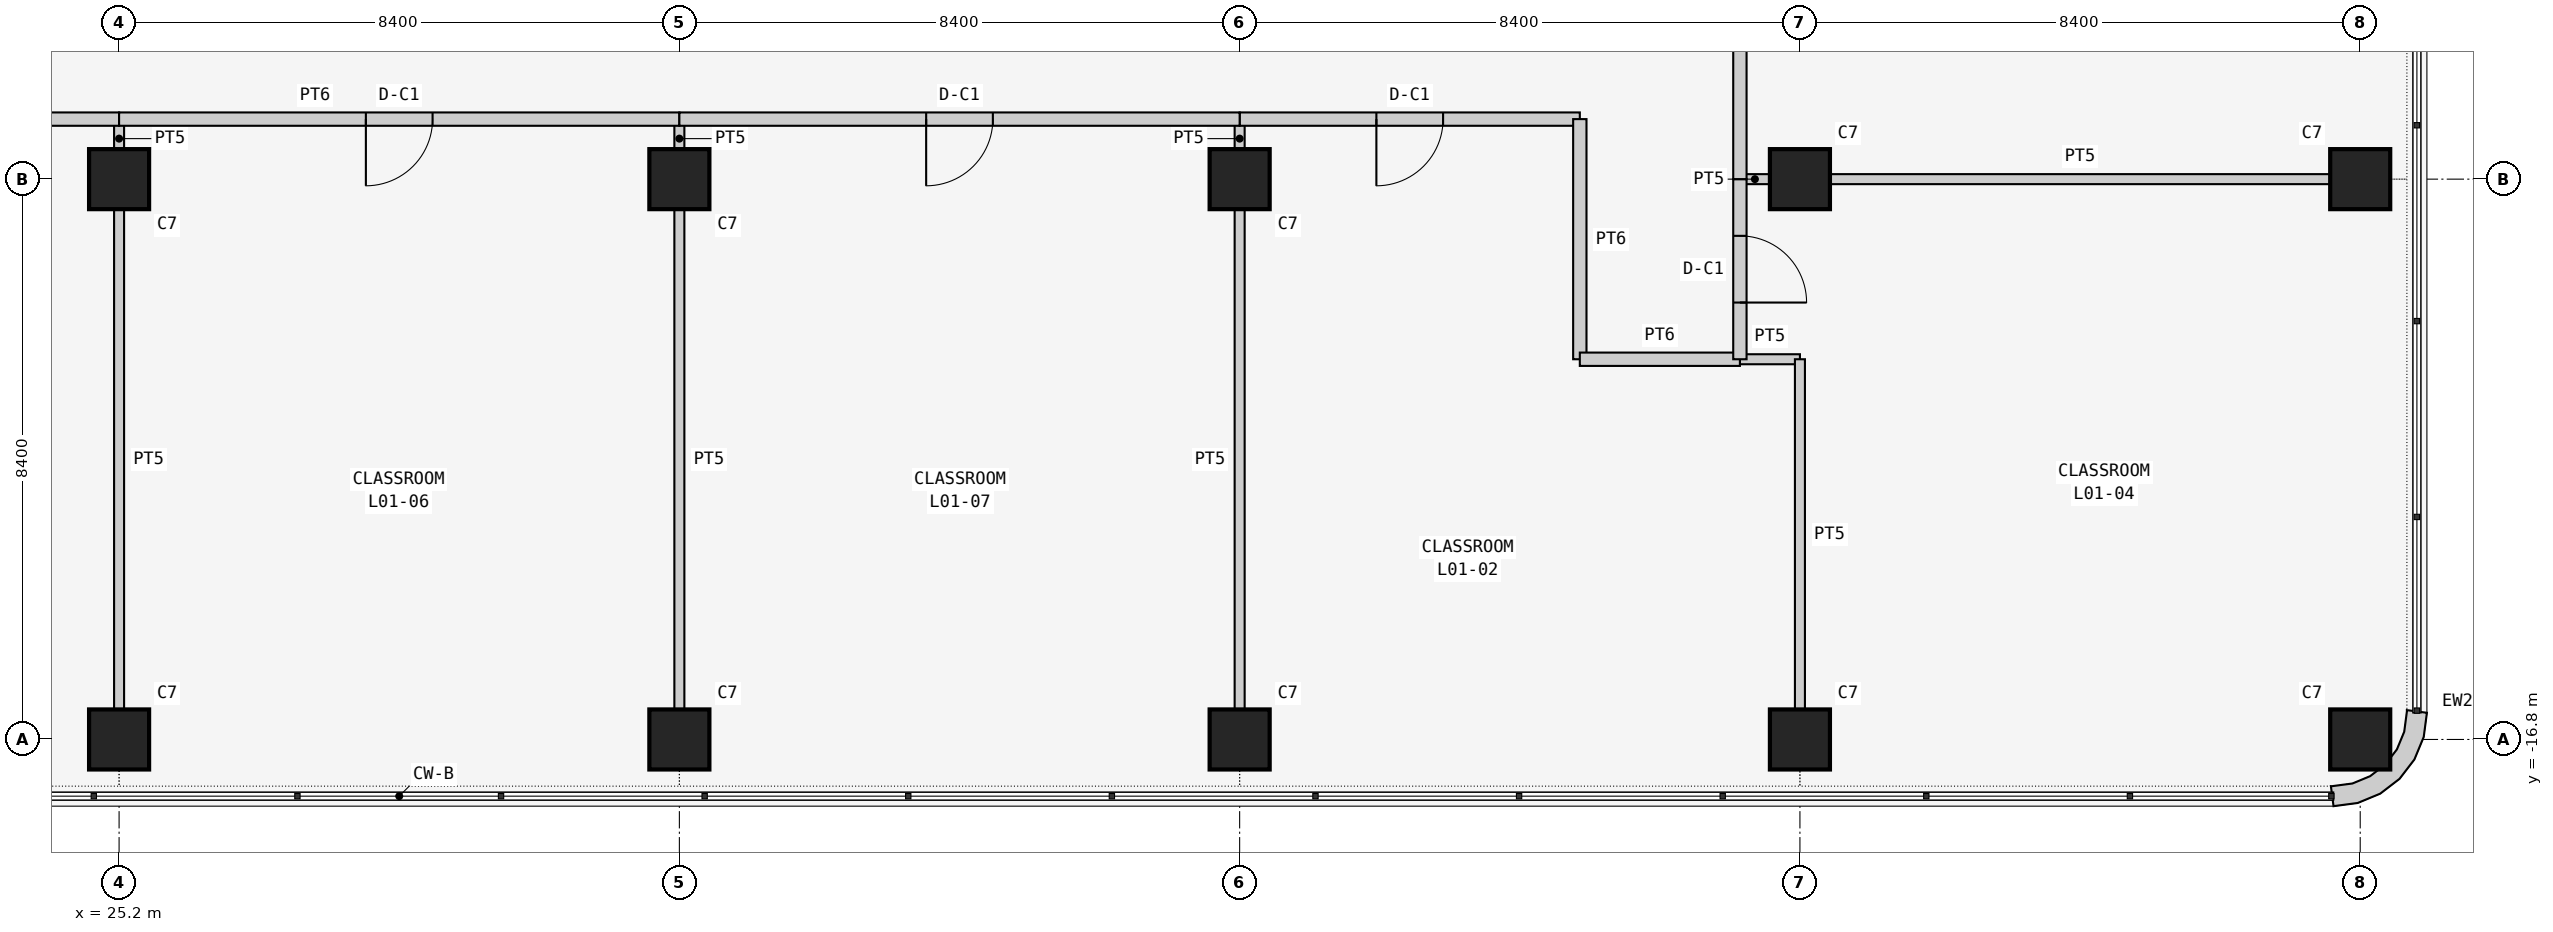
"""IFC4 building model, lengths in metres.
Left out: names, types, materials, properties, quantities, classifications, styles, units other than length and angle.
Written with IfcOpenShell. Run it as: python <this file> out.ifc"""

import sys

from ifc_helpers import new_model, si_unit, direction, frame, frame_2d, origin, origin_2d, place, context, subcontext, project, spatial, polyline, rectangle, outline, extrude, element, fill, save


model = new_model("IFC4")
c1 = context("Model", 3, precision=1e-05, world=origin(), true_north=direction((0.0, 1.0)))
c2 = subcontext(c1, "Body", "Model", "MODEL_VIEW")
j1 = project(units=[si_unit("LENGTHUNIT", "METRE"), si_unit("PLANEANGLEUNIT", "RADIAN")], contexts=[c1])
p1 = place(None, origin())
s1 = spatial("IfcSite", under=j1, at=p1, CompositionType="ELEMENT")
p2 = place(p1, origin())
s2 = spatial("IfcBuilding", under=s1, at=p2, CompositionType="ELEMENT")
p3 = place(p2, frame((0.0, 0.0, 6.0)))
s3 = spatial("IfcBuildingStorey", under=s2, at=p3, CompositionType="ELEMENT", Elevation=6.0)
for number, where, z_axis, x_axis in (
    (1, (25.2, -16.8, 0.0), (0.0, 0.0, 1.0), (1.0, 0.0, 0.0)),
    (2, (25.2, -8.4, 0.0), (0.0, 0.0, 1.0), (1.0, 0.0, 0.0)),
    (3, (33.6, -16.8, 0.0), (0.0, 0.0, 1.0), (1.0, 0.0, 0.0)),
    (4, (33.6, -8.4, 0.0), (0.0, 0.0, 1.0), (1.0, 0.0, 0.0)),
    (5, (42.0, -16.8, 0.0), (0.0, 0.0, 1.0), (1.0, 0.0, 0.0)),
    (6, (42.0, -8.4, 0.0), (0.0, 0.0, 1.0), (1.0, 0.0, 0.0)),
    (7, (50.4, -16.8, 0.0), (0.0, 0.0, 1.0), (1.0, 0.0, 0.0)),
    (8, (50.4, -8.4, 0.0), (0.0, 0.0, 1.0), (1.0, 0.0, 0.0)),
    (9, (58.8, -16.8, 0.0), (0.0, 0.0, 1.0), (1.0, 0.0, 0.0)),
    (10, (58.8, -8.4, 0.0), (0.0, 0.0, 1.0), (1.0, 0.0, 0.0)),
):
    element("IfcColumn", number, at=place(p3, frame(where, z_axis=z_axis, x_axis=x_axis)), inside=s3, PredefinedType="COLUMN", context=c2, shape_type="SweptSolid", body=[
        extrude(rectangle(XDim=0.9, YDim=0.9, at=origin_2d()), origin(), (0.0, 0.0, 1.0), 4.5),
    ])
p4 = place(p3, frame((58.355, -17.648, 0.0), z_axis=(0.0, 0.0, 1.0), x_axis=(0.707106781187, -0.707106781187, 0.0)))
e11 = element("IfcWall", 11, at=p4, inside=s3, PredefinedType="SOLIDWALL", context=c2, shape_type="SweptSolid", body=[
    extrude(outline(polyline([(0.139, 1.904), (-0.101, 1.72), (-0.087, 1.706), (0.1, 1.463), (0.209, 1.198), (0.246, 0.914), (0.209, 0.63), (0.1, 0.365), (-0.087, 0.122), (-0.101, 0.108), (0.139, -0.076), (0.362, 0.214), (0.502, 0.552), (0.549, 0.914), (0.502, 1.276), (0.362, 1.614), (0.139, 1.904)])), origin(), (0.0, 0.0, 1.0), 4.3),
])
p5 = place(p3, frame((49.5, -11.1, 0.0), z_axis=(0.0, 0.0, 1.0), x_axis=(1.0, 0.0, 0.0)))
e12 = element("IfcWall", 12, at=p5, inside=s3, PredefinedType="PARTITIONING", context=c2, shape_type="SweptSolid", body=[
    extrude(rectangle(XDim=0.9, YDim=0.15, at=frame_2d((0.45, 0.0))), origin(), (0.0, 0.0, 1.0), 4.3),
])
p6 = place(p3, frame((50.4, -11.1, 0.0), z_axis=(0.0, 0.0, 1.0), x_axis=(0.0, -1.0, 0.0)))
e13 = element("IfcWall", 13, at=p6, inside=s3, PredefinedType="PARTITIONING", context=c2, shape_type="SweptSolid", body=[
    extrude(rectangle(XDim=5.25, YDim=0.15, at=frame_2d((2.625, 0.0))), origin(), (0.0, 0.0, 1.0), 3.543),
])
p7 = place(p3, frame((42.0, -16.35, 0.0), z_axis=(0.0, 0.0, 1.0), x_axis=(0.0, 1.0, 0.0)))
e14 = element("IfcWall", 14, at=p7, inside=s3, PredefinedType="PARTITIONING", context=c2, shape_type="SweptSolid", body=[
    extrude(rectangle(XDim=7.5, YDim=0.15, at=frame_2d((3.75, 0.0))), origin(), (0.0, 0.0, 1.0), 3.543),
])
p8 = place(p3, frame((42.0, -7.95, 0.0), z_axis=(0.0, 0.0, 1.0), x_axis=(0.0, 1.0, 0.0)))
e15 = element("IfcWall", 15, at=p8, inside=s3, PredefinedType="PARTITIONING", context=c2, shape_type="SweptSolid", body=[
    extrude(rectangle(XDim=0.45, YDim=0.15, at=frame_2d((0.225, 0.0))), origin(), (0.0, 0.0, 1.0), 3.543),
])
p9 = place(p3, frame((42.0, -7.5, 0.0), z_axis=(0.0, 0.0, 1.0), x_axis=(1.0, 0.0, 0.0)))
e16 = element("IfcWall", 16, at=p9, inside=s3, PredefinedType="PARTITIONING", context=c2, shape_type="SweptSolid", body=[
    extrude(rectangle(XDim=5.1, YDim=0.2, at=frame_2d((2.55, 0.0))), origin(), (0.0, 0.0, 1.0), 4.3),
])
p10 = place(p9, frame((2.05, 0.0, 0.0)))
e17 = element("IfcOpeningElement", 17, at=p10, cuts=e16, PredefinedType="OPENING", context=c2, shape_type="SweptSolid", body=[
    extrude(rectangle(XDim=1.0, YDim=2.1, at=frame_2d((0.5, 1.05))), frame((0.0, 0.11, 0.0), z_axis=(0.0, -1.0, 0.0), x_axis=(1.0, 0.0, 0.0)), (0.0, 0.0, 1.0), 0.22),
])
p11 = place(p3, frame((47.1, -7.5, 0.0), z_axis=(0.0, 0.0, 1.0), x_axis=(0.0, -1.0, 0.0)))
e18 = element("IfcWall", 18, at=p11, inside=s3, PredefinedType="PARTITIONING", context=c2, shape_type="SweptSolid", body=[
    extrude(rectangle(XDim=3.6, YDim=0.2, at=frame_2d((1.8, 0.0))), origin(), (0.0, 0.0, 1.0), 4.3),
])
p12 = place(p3, frame((47.1, -11.1, 0.0), z_axis=(0.0, 0.0, 1.0), x_axis=(1.0, 0.0, 0.0)))
e19 = element("IfcWall", 19, at=p12, inside=s3, PredefinedType="PARTITIONING", context=c2, shape_type="SweptSolid", body=[
    extrude(rectangle(XDim=2.4, YDim=0.2, at=frame_2d((1.2, 0.0))), origin(), (0.0, 0.0, 1.0), 4.3),
])
p13 = place(p3, frame((49.5, -8.4, 0.0), z_axis=(0.0, 0.0, 1.0), x_axis=(1.0, 0.0, 0.0)))
e20 = element("IfcWall", 20, at=p13, inside=s3, PredefinedType="PARTITIONING", context=c2, shape_type="SweptSolid", body=[
    extrude(rectangle(XDim=0.45, YDim=0.15, at=frame_2d((0.225, 0.0))), origin(), (0.0, 0.0, 1.0), 3.543),
])
p14 = place(p3, frame((50.85, -8.4, 0.0), z_axis=(0.0, 0.0, 1.0), x_axis=(1.0, 0.0, 0.0)))
e21 = element("IfcWall", 21, at=p14, inside=s3, PredefinedType="PARTITIONING", context=c2, shape_type="SweptSolid", body=[
    extrude(rectangle(XDim=7.5, YDim=0.15, at=frame_2d((3.75, 0.0))), origin(), (0.0, 0.0, 1.0), 3.543),
])
p15 = place(p3, frame((49.5, -11.1, 0.0), z_axis=(0.0, 0.0, 1.0), x_axis=(0.0, 1.0, 0.0)))
e22 = element("IfcWall", 22, at=p15, inside=s3, PredefinedType="PARTITIONING", context=c2, shape_type="SweptSolid", body=[
    extrude(rectangle(XDim=2.7, YDim=0.2, at=frame_2d((1.35, 0.0))), origin(), (0.0, 0.0, 1.0), 4.3),
])
p16 = place(p15, frame((0.85, 0.0, 0.0)))
e23 = element("IfcOpeningElement", 23, at=p16, cuts=e22, PredefinedType="OPENING", context=c2, shape_type="SweptSolid", body=[
    extrude(rectangle(XDim=1.0, YDim=2.1, at=frame_2d((0.5, 1.05))), frame((0.0, 0.11, 0.0), z_axis=(0.0, -1.0, 0.0), x_axis=(1.0, 0.0, 0.0)), (0.0, 0.0, 1.0), 0.22),
])
p17 = place(p3, frame((25.2, -8.85, 0.0), z_axis=(0.0, 0.0, 1.0), x_axis=(0.0, -1.0, 0.0)))
e24 = element("IfcWall", 24, at=p17, inside=s3, PredefinedType="PARTITIONING", context=c2, shape_type="SweptSolid", body=[
    extrude(rectangle(XDim=7.5, YDim=0.15, at=frame_2d((3.75, 0.0))), origin(), (0.0, 0.0, 1.0), 3.543),
])
p18 = place(p3, frame((25.2, -7.5, 0.0), z_axis=(0.0, 0.0, 1.0), x_axis=(0.0, -1.0, 0.0)))
e25 = element("IfcWall", 25, at=p18, inside=s3, PredefinedType="PARTITIONING", context=c2, shape_type="SweptSolid", body=[
    extrude(rectangle(XDim=0.45, YDim=0.15, at=frame_2d((0.225, 0.0))), origin(), (0.0, 0.0, 1.0), 3.543),
])
p19 = place(p3, frame((16.8, -7.5, 0.0), z_axis=(0.0, 0.0, 1.0), x_axis=(1.0, 0.0, 0.0)))
e26 = element("IfcWall", 26, at=p19, inside=s3, PredefinedType="PARTITIONING", context=c2, shape_type="SweptSolid", body=[
    extrude(rectangle(XDim=8.4, YDim=0.2, at=frame_2d((4.2, 0.0))), origin(), (0.0, 0.0, 1.0), 4.3),
])
p20 = place(p19, frame((3.7, 0.0, 0.0)))
e27 = element("IfcOpeningElement", 27, at=p20, cuts=e26, PredefinedType="OPENING", context=c2, shape_type="SweptSolid", body=[
    extrude(rectangle(XDim=1.0, YDim=2.1, at=frame_2d((0.5, 1.05))), frame((0.0, 0.11, 0.0), z_axis=(0.0, -1.0, 0.0), x_axis=(1.0, 0.0, 0.0)), (0.0, 0.0, 1.0), 0.22),
])
p21 = place(p3, frame((33.6, -8.85, 0.0), z_axis=(0.0, 0.0, 1.0), x_axis=(0.0, -1.0, 0.0)))
e28 = element("IfcWall", 28, at=p21, inside=s3, PredefinedType="PARTITIONING", context=c2, shape_type="SweptSolid", body=[
    extrude(rectangle(XDim=7.5, YDim=0.15, at=frame_2d((3.75, 0.0))), origin(), (0.0, 0.0, 1.0), 3.543),
])
p22 = place(p3, frame((33.6, -7.5, 0.0), z_axis=(0.0, 0.0, 1.0), x_axis=(0.0, -1.0, 0.0)))
e29 = element("IfcWall", 29, at=p22, inside=s3, PredefinedType="PARTITIONING", context=c2, shape_type="SweptSolid", body=[
    extrude(rectangle(XDim=0.45, YDim=0.15, at=frame_2d((0.225, 0.0))), origin(), (0.0, 0.0, 1.0), 3.543),
])
p23 = place(p3, frame((25.2, -7.5, 0.0), z_axis=(0.0, 0.0, 1.0), x_axis=(1.0, 0.0, 0.0)))
e30 = element("IfcWall", 30, at=p23, inside=s3, PredefinedType="PARTITIONING", context=c2, shape_type="SweptSolid", body=[
    extrude(rectangle(XDim=8.4, YDim=0.2, at=frame_2d((4.2, 0.0))), origin(), (0.0, 0.0, 1.0), 4.3),
])
p24 = place(p23, frame((3.7, 0.0, 0.0)))
e31 = element("IfcOpeningElement", 31, at=p24, cuts=e30, PredefinedType="OPENING", context=c2, shape_type="SweptSolid", body=[
    extrude(rectangle(XDim=1.0, YDim=2.1, at=frame_2d((0.5, 1.05))), frame((0.0, 0.11, 0.0), z_axis=(0.0, -1.0, 0.0), x_axis=(1.0, 0.0, 0.0)), (0.0, 0.0, 1.0), 0.22),
])
p25 = place(p3, frame((33.6, -7.5, 0.0), z_axis=(0.0, 0.0, 1.0), x_axis=(1.0, 0.0, 0.0)))
e32 = element("IfcWall", 32, at=p25, inside=s3, PredefinedType="PARTITIONING", context=c2, shape_type="SweptSolid", body=[
    extrude(rectangle(XDim=8.4, YDim=0.2, at=frame_2d((4.2, 0.0))), origin(), (0.0, 0.0, 1.0), 4.3),
])
p26 = place(p25, frame((3.7, 0.0, 0.0)))
e33 = element("IfcOpeningElement", 33, at=p26, cuts=e32, PredefinedType="OPENING", context=c2, shape_type="SweptSolid", body=[
    extrude(rectangle(XDim=1.0, YDim=2.1, at=frame_2d((0.5, 1.05))), frame((0.0, 0.11, 0.0), z_axis=(0.0, -1.0, 0.0), x_axis=(1.0, 0.0, 0.0)), (0.0, 0.0, 1.0), 0.22),
])
p27 = place(p3, frame((49.5, -8.4, 0.0), z_axis=(0.0, 0.0, 1.0), x_axis=(0.0, 1.0, 0.0)))
e34 = element("IfcWall", 34, at=p27, inside=s3, PredefinedType="PARTITIONING", context=c2, shape_type="SweptSolid", body=[
    extrude(rectangle(XDim=8.4, YDim=0.2, at=frame_2d((4.2, 0.0))), origin(), (0.0, 0.0, 1.0), 4.3),
])
p28 = place(p27, frame((3.7, 0.0, 0.0)))
e35 = element("IfcOpeningElement", 35, at=p28, cuts=e34, PredefinedType="OPENING", context=c2, shape_type="SweptSolid", body=[
    extrude(rectangle(XDim=1.0, YDim=2.1, at=frame_2d((0.5, 1.05))), frame((0.0, 0.11, 0.0), z_axis=(0.0, -1.0, 0.0), x_axis=(1.0, 0.0, 0.0)), (0.0, 0.0, 1.0), 0.22),
])
p29 = place(p10, frame((1.0, 0.0, 0.0), z_axis=(0.0, 0.0, 1.0), x_axis=(-1.0, 0.0, 0.0)))
e36 = element("IfcDoor", 36, at=p29, inside=s3, OperationType="SINGLE_SWING_RIGHT", PredefinedType="DOOR", context=c2, shape_type="SweptSolid", body=[
    extrude(rectangle(XDim=1.0, YDim=2.1, at=frame_2d((0.5, 1.05))), frame((0.0, 0.025, 0.0), z_axis=(0.0, -1.0, 0.0), x_axis=(1.0, 0.0, 0.0)), (0.0, 0.0, 1.0), 0.05),
])
fill(e17, e36)
p30 = place(p16, frame((1.0, 0.0, 0.0), z_axis=(0.0, 0.0, 1.0), x_axis=(-1.0, 0.0, 0.0)))
e37 = element("IfcDoor", 37, at=p30, inside=s3, OperationType="SINGLE_SWING_RIGHT", PredefinedType="DOOR", context=c2, shape_type="SweptSolid", body=[
    extrude(rectangle(XDim=1.0, YDim=2.1, at=frame_2d((0.5, 1.05))), frame((0.0, 0.025, 0.0), z_axis=(0.0, -1.0, 0.0), x_axis=(1.0, 0.0, 0.0)), (0.0, 0.0, 1.0), 0.05),
])
fill(e23, e37)
p31 = place(p24, frame((1.0, 0.0, 0.0), z_axis=(0.0, 0.0, 1.0), x_axis=(-1.0, 0.0, 0.0)))
e38 = element("IfcDoor", 38, at=p31, inside=s3, OperationType="SINGLE_SWING_RIGHT", PredefinedType="DOOR", context=c2, shape_type="SweptSolid", body=[
    extrude(rectangle(XDim=1.0, YDim=2.1, at=frame_2d((0.5, 1.05))), frame((0.0, 0.025, 0.0), z_axis=(0.0, -1.0, 0.0), x_axis=(1.0, 0.0, 0.0)), (0.0, 0.0, 1.0), 0.05),
])
fill(e31, e38)
p32 = place(p26, frame((1.0, 0.0, 0.0), z_axis=(0.0, 0.0, 1.0), x_axis=(-1.0, 0.0, 0.0)))
e39 = element("IfcDoor", 39, at=p32, inside=s3, OperationType="SINGLE_SWING_RIGHT", PredefinedType="DOOR", context=c2, shape_type="SweptSolid", body=[
    extrude(rectangle(XDim=1.0, YDim=2.1, at=frame_2d((0.5, 1.05))), frame((0.0, 0.025, 0.0), z_axis=(0.0, -1.0, 0.0), x_axis=(1.0, 0.0, 0.0)), (0.0, 0.0, 1.0), 0.05),
])
fill(e33, e39)
save(model, sys.argv[1])
